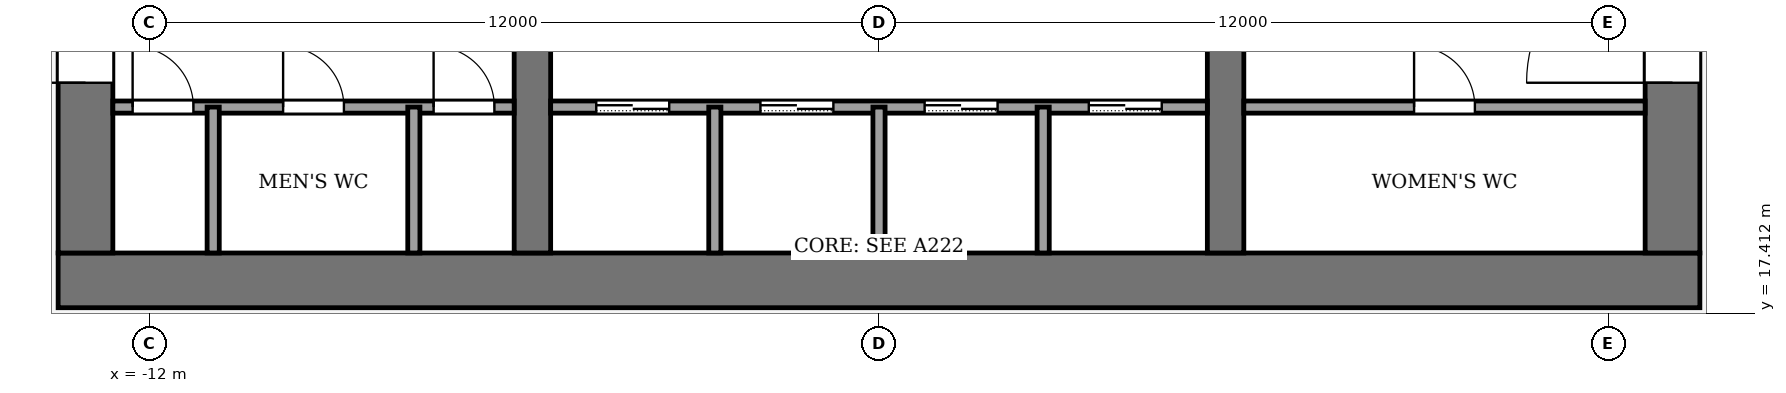
"""IFC4 building model, lengths in metres.
Left out: names, types, materials, properties, quantities, classifications, styles, units other than length and angle.
Written with IfcOpenShell. Run it as: python <this file> out.ifc"""

import sys

from ifc_helpers import new_model, si_unit, direction, frame, frame_2d, origin, place, context, subcontext, project, spatial, rectangle, extrude, element, fill, save


model = new_model("IFC4")
c1 = context("Model", 3, precision=1e-05, world=origin(), true_north=direction((0.0, 1.0)))
c2 = subcontext(c1, "Body", "Model", "MODEL_VIEW")
j1 = project(units=[si_unit("LENGTHUNIT", "METRE"), si_unit("PLANEANGLEUNIT", "RADIAN")], contexts=[c1])
p1 = place(None, origin())
s1 = spatial("IfcSite", under=j1, at=p1, CompositionType="ELEMENT")
p2 = place(p1, origin())
s2 = spatial("IfcBuilding", under=s1, at=p2, CompositionType="ELEMENT")
p3 = place(p2, frame((0.0, 0.0, 206.0)))
s3 = spatial("IfcBuildingStorey", under=s2, at=p3, CompositionType="ELEMENT", Elevation=206.0)
p4 = place(p3, frame((-13.5, 17.95, -0.13), z_axis=(0.0, 0.0, 1.0), x_axis=(1.0, 0.0, 0.0)))
e1 = element("IfcWall", 1, at=p4, inside=s3, PredefinedType="SHEAR", context=c2, shape_type="SweptSolid", body=[
    extrude(rectangle(XDim=27.0, YDim=0.9, at=frame_2d((13.5, 0.0))), origin(), (0.0, 0.0, 1.0), 4.0),
])
p5 = place(p3, frame((-13.05, 18.4, -0.13), z_axis=(0.0, 0.0, 1.0), x_axis=(0.0, 1.0, 0.0)))
e2 = element("IfcWall", 2, at=p5, inside=s3, PredefinedType="SHEAR", context=c2, shape_type="SweptSolid", body=[
    extrude(rectangle(XDim=19.2, YDim=0.9, at=frame_2d((9.6, 0.0))), origin(), (0.0, 0.0, 1.0), 4.0),
])
p6 = place(p5, frame((2.8, 0.0, 0.13)))
e3 = element("IfcOpeningElement", 3, at=p6, cuts=e2, PredefinedType="OPENING", context=c2, shape_type="SweptSolid", body=[
    extrude(rectangle(XDim=2.4, YDim=2.4, at=frame_2d((1.2, 1.2))), frame((0.0, 0.46, 0.0), z_axis=(0.0, -1.0, 0.0), x_axis=(1.0, 0.0, 0.0)), (0.0, 0.0, 1.0), 0.92),
])
p7 = place(p5, frame((13.4, 0.0, 0.13)))
e4 = element("IfcOpeningElement", 4, at=p7, cuts=e2, PredefinedType="OPENING", context=c2, shape_type="SweptSolid", body=[
    extrude(rectangle(XDim=1.4, YDim=2.2, at=frame_2d((0.7, 1.1))), frame((0.0, 0.46, 0.0), z_axis=(0.0, -1.0, 0.0), x_axis=(1.0, 0.0, 0.0)), (0.0, 0.0, 1.0), 0.92),
])
p8 = place(p3, frame((13.05, 18.4, -0.13), z_axis=(0.0, 0.0, 1.0), x_axis=(0.0, 1.0, 0.0)))
e5 = element("IfcWall", 5, at=p8, inside=s3, PredefinedType="SHEAR", context=c2, shape_type="SweptSolid", body=[
    extrude(rectangle(XDim=19.2, YDim=0.9, at=frame_2d((9.6, 0.0))), origin(), (0.0, 0.0, 1.0), 4.0),
])
p9 = place(p8, frame((2.8, 0.0, 0.13)))
e6 = element("IfcOpeningElement", 6, at=p9, cuts=e5, PredefinedType="OPENING", context=c2, shape_type="SweptSolid", body=[
    extrude(rectangle(XDim=2.4, YDim=2.4, at=frame_2d((1.2, 1.2))), frame((0.0, 0.46, 0.0), z_axis=(0.0, -1.0, 0.0), x_axis=(1.0, 0.0, 0.0)), (0.0, 0.0, 1.0), 0.92),
])
p10 = place(p8, frame((13.3, 0.0, 0.13)))
e7 = element("IfcOpeningElement", 7, at=p10, cuts=e5, PredefinedType="OPENING", context=c2, shape_type="SweptSolid", body=[
    extrude(rectangle(XDim=2.4, YDim=2.4, at=frame_2d((1.2, 1.2))), frame((0.0, 0.46, 0.0), z_axis=(0.0, -1.0, 0.0), x_axis=(1.0, 0.0, 0.0)), (0.0, 0.0, 1.0), 0.92),
])
p11 = place(p3, frame((-5.7, 18.4, -0.13), z_axis=(0.0, 0.0, 1.0), x_axis=(0.0, 1.0, 0.0)))
e8 = element("IfcWall", 8, at=p11, inside=s3, PredefinedType="SHEAR", context=c2, shape_type="SweptSolid", body=[
    extrude(rectangle(XDim=19.2, YDim=0.6, at=frame_2d((9.6, 0.0))), origin(), (0.0, 0.0, 1.0), 4.0),
])
p12 = place(p11, frame((8.35, 0.0, 0.13)))
e9 = element("IfcOpeningElement", 9, at=p12, cuts=e8, PredefinedType="OPENING", context=c2, shape_type="SweptSolid", body=[
    extrude(rectangle(XDim=0.9, YDim=2.1, at=frame_2d((0.45, 1.05))), frame((0.0, 0.31, 0.0), z_axis=(0.0, -1.0, 0.0), x_axis=(1.0, 0.0, 0.0)), (0.0, 0.0, 1.0), 0.62),
])
p13 = place(p3, frame((5.7, 18.4, -0.13), z_axis=(0.0, 0.0, 1.0), x_axis=(0.0, 1.0, 0.0)))
e10 = element("IfcWall", 10, at=p13, inside=s3, PredefinedType="SHEAR", context=c2, shape_type="SweptSolid", body=[
    extrude(rectangle(XDim=19.2, YDim=0.6, at=frame_2d((9.6, 0.0))), origin(), (0.0, 0.0, 1.0), 4.0),
])
p14 = place(p13, frame((8.35, 0.0, 0.13)))
e11 = element("IfcOpeningElement", 11, at=p14, cuts=e10, PredefinedType="OPENING", context=c2, shape_type="SweptSolid", body=[
    extrude(rectangle(XDim=0.9, YDim=2.1, at=frame_2d((0.45, 1.05))), frame((0.0, 0.31, 0.0), z_axis=(0.0, -1.0, 0.0), x_axis=(1.0, 0.0, 0.0)), (0.0, 0.0, 1.0), 0.62),
])
p15 = place(p13, frame((13.3, 0.0, 0.13)))
e12 = element("IfcOpeningElement", 12, at=p15, cuts=e10, PredefinedType="OPENING", context=c2, shape_type="SweptSolid", body=[
    extrude(rectangle(XDim=2.4, YDim=2.4, at=frame_2d((1.2, 1.2))), frame((0.0, 0.31, 0.0), z_axis=(0.0, -1.0, 0.0), x_axis=(1.0, 0.0, 0.0)), (0.0, 0.0, 1.0), 0.62),
])
p16 = place(p3, frame((-12.6, 20.8, 0.0), z_axis=(0.0, 0.0, 1.0), x_axis=(1.0, 0.0, 0.0)))
e13 = element("IfcWall", 13, at=p16, inside=s3, PredefinedType="PARTITIONING", context=c2, shape_type="SweptSolid", body=[
    extrude(rectangle(XDim=6.6, YDim=0.2, at=frame_2d((3.3, 0.0))), origin(), (0.0, 0.0, 1.0), 3.87),
])
p17 = place(p16, frame((0.325, 0.0, 0.0)))
e14 = element("IfcOpeningElement", 14, at=p17, cuts=e13, PredefinedType="OPENING", context=c2, shape_type="SweptSolid", body=[
    extrude(rectangle(XDim=1.0, YDim=2.1, at=frame_2d((0.5, 1.05))), frame((0.0, 0.11, 0.0), z_axis=(0.0, -1.0, 0.0), x_axis=(1.0, 0.0, 0.0)), (0.0, 0.0, 1.0), 0.22),
])
p18 = place(p16, frame((2.8, 0.0, 0.0)))
e15 = element("IfcOpeningElement", 15, at=p18, cuts=e13, PredefinedType="OPENING", context=c2, shape_type="SweptSolid", body=[
    extrude(rectangle(XDim=1.0, YDim=2.1, at=frame_2d((0.5, 1.05))), frame((0.0, 0.11, 0.0), z_axis=(0.0, -1.0, 0.0), x_axis=(1.0, 0.0, 0.0)), (0.0, 0.0, 1.0), 0.22),
])
p19 = place(p16, frame((5.275, 0.0, 0.0)))
e16 = element("IfcOpeningElement", 16, at=p19, cuts=e13, PredefinedType="OPENING", context=c2, shape_type="SweptSolid", body=[
    extrude(rectangle(XDim=1.0, YDim=2.1, at=frame_2d((0.5, 1.05))), frame((0.0, 0.11, 0.0), z_axis=(0.0, -1.0, 0.0), x_axis=(1.0, 0.0, 0.0)), (0.0, 0.0, 1.0), 0.22),
])
p20 = place(p3, frame((-5.4, 20.8, 0.0), z_axis=(0.0, 0.0, 1.0), x_axis=(1.0, 0.0, 0.0)))
e17 = element("IfcWall", 17, at=p20, inside=s3, PredefinedType="PARTITIONING", context=c2, shape_type="SweptSolid", body=[
    extrude(rectangle(XDim=10.8, YDim=0.2, at=frame_2d((5.4, 0.0))), origin(), (0.0, 0.0, 1.0), 3.87),
])
p21 = place(p20, frame((0.75, 0.0, 0.0)))
e18 = element("IfcOpeningElement", 18, at=p21, cuts=e17, PredefinedType="OPENING", context=c2, shape_type="SweptSolid", body=[
    extrude(rectangle(XDim=1.2, YDim=2.2, at=frame_2d((0.6, 1.1))), frame((0.0, 0.11, 0.0), z_axis=(0.0, -1.0, 0.0), x_axis=(1.0, 0.0, 0.0)), (0.0, 0.0, 1.0), 0.22),
])
p22 = place(p20, frame((3.45, 0.0, 0.0)))
e19 = element("IfcOpeningElement", 19, at=p22, cuts=e17, PredefinedType="OPENING", context=c2, shape_type="SweptSolid", body=[
    extrude(rectangle(XDim=1.2, YDim=2.2, at=frame_2d((0.6, 1.1))), frame((0.0, 0.11, 0.0), z_axis=(0.0, -1.0, 0.0), x_axis=(1.0, 0.0, 0.0)), (0.0, 0.0, 1.0), 0.22),
])
p23 = place(p20, frame((6.15, 0.0, 0.0)))
e20 = element("IfcOpeningElement", 20, at=p23, cuts=e17, PredefinedType="OPENING", context=c2, shape_type="SweptSolid", body=[
    extrude(rectangle(XDim=1.2, YDim=2.2, at=frame_2d((0.6, 1.1))), frame((0.0, 0.11, 0.0), z_axis=(0.0, -1.0, 0.0), x_axis=(1.0, 0.0, 0.0)), (0.0, 0.0, 1.0), 0.22),
])
p24 = place(p20, frame((8.85, 0.0, 0.0)))
e21 = element("IfcOpeningElement", 21, at=p24, cuts=e17, PredefinedType="OPENING", context=c2, shape_type="SweptSolid", body=[
    extrude(rectangle(XDim=1.2, YDim=2.2, at=frame_2d((0.6, 1.1))), frame((0.0, 0.11, 0.0), z_axis=(0.0, -1.0, 0.0), x_axis=(1.0, 0.0, 0.0)), (0.0, 0.0, 1.0), 0.22),
])
p25 = place(p3, frame((6.0, 20.8, 0.0), z_axis=(0.0, 0.0, 1.0), x_axis=(1.0, 0.0, 0.0)))
e22 = element("IfcWall", 22, at=p25, inside=s3, PredefinedType="PARTITIONING", context=c2, shape_type="SweptSolid", body=[
    extrude(rectangle(XDim=6.6, YDim=0.2, at=frame_2d((3.3, 0.0))), origin(), (0.0, 0.0, 1.0), 3.87),
])
p26 = place(p25, frame((2.8, 0.0, 0.0)))
e23 = element("IfcOpeningElement", 23, at=p26, cuts=e22, PredefinedType="OPENING", context=c2, shape_type="SweptSolid", body=[
    extrude(rectangle(XDim=1.0, YDim=2.1, at=frame_2d((0.5, 1.05))), frame((0.0, 0.11, 0.0), z_axis=(0.0, -1.0, 0.0), x_axis=(1.0, 0.0, 0.0)), (0.0, 0.0, 1.0), 0.22),
])
for number, where, z_axis, x_axis in (
    (24, (-10.95, 18.4, 0.0), (0.0, 0.0, 1.0), (0.0, 1.0, 0.0)),
    (25, (-7.65, 18.4, 0.0), (0.0, 0.0, 1.0), (0.0, 1.0, 0.0)),
    (26, (-2.7, 18.4, 0.0), (0.0, 0.0, 1.0), (0.0, 1.0, 0.0)),
    (27, (0.0, 18.4, 0.0), (0.0, 0.0, 1.0), (0.0, 1.0, 0.0)),
    (28, (2.7, 18.4, 0.0), (0.0, 0.0, 1.0), (0.0, 1.0, 0.0)),
):
    element("IfcWall", number, at=place(p3, frame(where, z_axis=z_axis, x_axis=x_axis)), inside=s3, PredefinedType="PARTITIONING", context=c2, shape_type="SweptSolid", body=[
        extrude(rectangle(XDim=2.4, YDim=0.2, at=frame_2d((1.2, 0.0))), origin(), (0.0, 0.0, 1.0), 3.87),
    ])
p27 = place(p21, origin())
e29 = element("IfcDoor", 29, at=p27, inside=s3, OperationType="SLIDING_TO_LEFT", PredefinedType="DOOR", context=c2, shape_type="SweptSolid", body=[
    extrude(rectangle(XDim=1.2, YDim=2.2, at=frame_2d((0.6, 1.1))), frame((0.0, 0.025, 0.0), z_axis=(0.0, -1.0, 0.0), x_axis=(1.0, 0.0, 0.0)), (0.0, 0.0, 1.0), 0.05),
])
fill(e18, e29)
p28 = place(p22, origin())
e30 = element("IfcDoor", 30, at=p28, inside=s3, OperationType="SLIDING_TO_LEFT", PredefinedType="DOOR", context=c2, shape_type="SweptSolid", body=[
    extrude(rectangle(XDim=1.2, YDim=2.2, at=frame_2d((0.6, 1.1))), frame((0.0, 0.025, 0.0), z_axis=(0.0, -1.0, 0.0), x_axis=(1.0, 0.0, 0.0)), (0.0, 0.0, 1.0), 0.05),
])
fill(e19, e30)
p29 = place(p23, origin())
e31 = element("IfcDoor", 31, at=p29, inside=s3, OperationType="SLIDING_TO_LEFT", PredefinedType="DOOR", context=c2, shape_type="SweptSolid", body=[
    extrude(rectangle(XDim=1.2, YDim=2.2, at=frame_2d((0.6, 1.1))), frame((0.0, 0.025, 0.0), z_axis=(0.0, -1.0, 0.0), x_axis=(1.0, 0.0, 0.0)), (0.0, 0.0, 1.0), 0.05),
])
fill(e20, e31)
p30 = place(p24, origin())
e32 = element("IfcDoor", 32, at=p30, inside=s3, OperationType="SLIDING_TO_LEFT", PredefinedType="DOOR", context=c2, shape_type="SweptSolid", body=[
    extrude(rectangle(XDim=1.2, YDim=2.2, at=frame_2d((0.6, 1.1))), frame((0.0, 0.025, 0.0), z_axis=(0.0, -1.0, 0.0), x_axis=(1.0, 0.0, 0.0)), (0.0, 0.0, 1.0), 0.05),
])
fill(e21, e32)
p31 = place(p17, origin())
e33 = element("IfcDoor", 33, at=p31, inside=s3, OperationType="SINGLE_SWING_RIGHT", PredefinedType="DOOR", context=c2, shape_type="SweptSolid", body=[
    extrude(rectangle(XDim=1.0, YDim=2.1, at=frame_2d((0.5, 1.05))), frame((0.0, 0.025, 0.0), z_axis=(0.0, -1.0, 0.0), x_axis=(1.0, 0.0, 0.0)), (0.0, 0.0, 1.0), 0.05),
])
fill(e14, e33)
p32 = place(p18, origin())
e34 = element("IfcDoor", 34, at=p32, inside=s3, OperationType="SINGLE_SWING_RIGHT", PredefinedType="DOOR", context=c2, shape_type="SweptSolid", body=[
    extrude(rectangle(XDim=1.0, YDim=2.1, at=frame_2d((0.5, 1.05))), frame((0.0, 0.025, 0.0), z_axis=(0.0, -1.0, 0.0), x_axis=(1.0, 0.0, 0.0)), (0.0, 0.0, 1.0), 0.05),
])
fill(e15, e34)
p33 = place(p19, origin())
e35 = element("IfcDoor", 35, at=p33, inside=s3, OperationType="SINGLE_SWING_RIGHT", PredefinedType="DOOR", context=c2, shape_type="SweptSolid", body=[
    extrude(rectangle(XDim=1.0, YDim=2.1, at=frame_2d((0.5, 1.05))), frame((0.0, 0.025, 0.0), z_axis=(0.0, -1.0, 0.0), x_axis=(1.0, 0.0, 0.0)), (0.0, 0.0, 1.0), 0.05),
])
fill(e16, e35)
p34 = place(p26, origin())
e36 = element("IfcDoor", 36, at=p34, inside=s3, OperationType="SINGLE_SWING_RIGHT", PredefinedType="DOOR", context=c2, shape_type="SweptSolid", body=[
    extrude(rectangle(XDim=1.0, YDim=2.1, at=frame_2d((0.5, 1.05))), frame((0.0, 0.025, 0.0), z_axis=(0.0, -1.0, 0.0), x_axis=(1.0, 0.0, 0.0)), (0.0, 0.0, 1.0), 0.05),
])
fill(e23, e36)
p35 = place(p6, origin())
e37 = element("IfcDoor", 37, at=p35, inside=s3, OperationType="DOUBLE_DOOR_SINGLE_SWING", PredefinedType="DOOR", context=c2, shape_type="SweptSolid", body=[
    extrude(rectangle(XDim=2.4, YDim=2.4, at=frame_2d((1.2, 1.2))), frame((0.0, 0.025, 0.0), z_axis=(0.0, -1.0, 0.0), x_axis=(1.0, 0.0, 0.0)), (0.0, 0.0, 1.0), 0.05),
])
fill(e3, e37)
p36 = place(p9, origin())
e38 = element("IfcDoor", 38, at=p36, inside=s3, OperationType="DOUBLE_DOOR_SINGLE_SWING", PredefinedType="DOOR", context=c2, shape_type="SweptSolid", body=[
    extrude(rectangle(XDim=2.4, YDim=2.4, at=frame_2d((1.2, 1.2))), frame((0.0, 0.025, 0.0), z_axis=(0.0, -1.0, 0.0), x_axis=(1.0, 0.0, 0.0)), (0.0, 0.0, 1.0), 0.05),
])
fill(e6, e38)
save(model, sys.argv[1])
